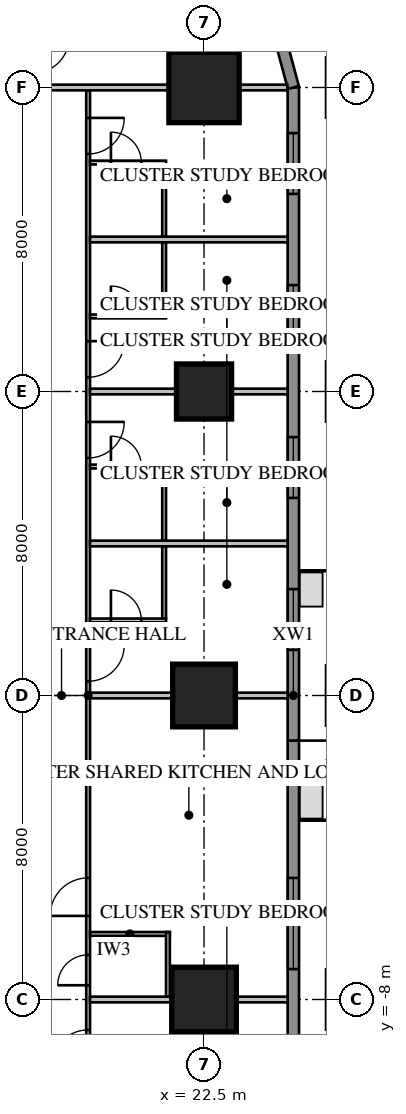
"""IFC4 building model, lengths in metres.
Left out: names, types, materials, properties, quantities, classifications, styles, units other than length and angle.
Written with IfcOpenShell. Run it as: python <this file> out.ifc"""

import sys

from ifc_helpers import new_model, si_unit, direction, frame, frame_2d, origin, origin_2d, place, context, subcontext, project, spatial, rectangle, extrude, element, fill, save


model = new_model("IFC4")
c1 = context("Model", 3, precision=1e-05, world=origin(), true_north=direction((0.0, 1.0)))
c2 = subcontext(c1, "Body", "Model", "MODEL_VIEW")
j1 = project(units=[si_unit("LENGTHUNIT", "METRE"), si_unit("PLANEANGLEUNIT", "RADIAN")], contexts=[c1])
p1 = place(None, origin())
s1 = spatial("IfcSite", under=j1, at=p1, CompositionType="ELEMENT")
p2 = place(p1, origin())
s2 = spatial("IfcBuilding", under=s1, at=p2, CompositionType="ELEMENT")
p3 = place(p2, frame((0.0, 0.0, 35.25)))
s3 = spatial("IfcBuildingStorey", under=s2, at=p3, CompositionType="ELEMENT", Elevation=35.25)
p4 = place(p3, frame((22.5, -8.0, 0.0), z_axis=(0.0, 0.0, 1.0), x_axis=(1.0, 0.0, 0.0)))
e1 = element("IfcColumn", 1, at=p4, inside=s3, PredefinedType="COLUMN", context=c2, shape_type="SweptSolid", body=[
    extrude(rectangle(XDim=1.7, YDim=1.7, at=origin_2d()), origin(), (0.0, 0.0, 1.0), 3.85),
])
p5 = place(p3, frame((22.5, 0.0, 0.0), z_axis=(0.0, 0.0, 1.0), x_axis=(1.0, 0.0, 0.0)))
e2 = element("IfcColumn", 2, at=p5, inside=s3, PredefinedType="COLUMN", context=c2, shape_type="SweptSolid", body=[
    extrude(rectangle(XDim=1.65, YDim=1.65, at=origin_2d()), origin(), (0.0, 0.0, 1.0), 3.85),
])
p6 = place(p3, frame((22.5, 8.0, 0.0), z_axis=(0.0, 0.0, 1.0), x_axis=(1.0, 0.0, 0.0)))
e3 = element("IfcColumn", 3, at=p6, inside=s3, PredefinedType="COLUMN", context=c2, shape_type="SweptSolid", body=[
    extrude(rectangle(XDim=1.45, YDim=1.45, at=origin_2d()), origin(), (0.0, 0.0, 1.0), 3.85),
])
p7 = place(p3, frame((22.5, 16.0, 0.0), z_axis=(0.0, 0.0, 1.0), x_axis=(1.0, 0.0, 0.0)))
e4 = element("IfcColumn", 4, at=p7, inside=s3, PredefinedType="COLUMN", context=c2, shape_type="SweptSolid", body=[
    extrude(rectangle(XDim=1.85, YDim=1.85, at=origin_2d()), origin(), (0.0, 0.0, 1.0), 3.85),
])
p8 = place(p3, frame((24.85, -16.0, 0.0), z_axis=(0.0, 0.0, 1.0), x_axis=(0.0, 1.0, 0.0)))
e5 = element("IfcWall", 5, at=p8, inside=s3, PredefinedType="SOLIDWALL", context=c2, shape_type="SweptSolid", body=[
    extrude(rectangle(XDim=32.0, YDim=0.3, at=frame_2d((16.0, 0.0))), origin(), (0.0, 0.0, 1.0), 3.65),
])
p9 = place(p8, frame((1.2, 0.0, 0.75)))
e6 = element("IfcOpeningElement", 6, at=p9, cuts=e5, PredefinedType="OPENING", context=c2, shape_type="SweptSolid", body=[
    extrude(rectangle(XDim=1.6, YDim=1.8, at=frame_2d((0.8, 0.9))), frame((0.0, 0.17, 0.0), z_axis=(0.0, -1.0, 0.0), x_axis=(1.0, 0.0, 0.0)), (0.0, 0.0, 1.0), 0.34),
])
p10 = place(p8, frame((5.2, 0.0, 0.75)))
e7 = element("IfcOpeningElement", 7, at=p10, cuts=e5, PredefinedType="OPENING", context=c2, shape_type="SweptSolid", body=[
    extrude(rectangle(XDim=1.6, YDim=1.8, at=frame_2d((0.8, 0.9))), frame((0.0, 0.17, 0.0), z_axis=(0.0, -1.0, 0.0), x_axis=(1.0, 0.0, 0.0)), (0.0, 0.0, 1.0), 0.34),
])
p11 = place(p8, frame((17.2, 0.0, 0.75)))
e8 = element("IfcOpeningElement", 8, at=p11, cuts=e5, PredefinedType="OPENING", context=c2, shape_type="SweptSolid", body=[
    extrude(rectangle(XDim=1.6, YDim=1.8, at=frame_2d((0.8, 0.9))), frame((0.0, 0.17, 0.0), z_axis=(0.0, -1.0, 0.0), x_axis=(1.0, 0.0, 0.0)), (0.0, 0.0, 1.0), 0.34),
])
p12 = place(p8, frame((21.2, 0.0, 0.75)))
e9 = element("IfcOpeningElement", 9, at=p12, cuts=e5, PredefinedType="OPENING", context=c2, shape_type="SweptSolid", body=[
    extrude(rectangle(XDim=1.6, YDim=1.8, at=frame_2d((0.8, 0.9))), frame((0.0, 0.17, 0.0), z_axis=(0.0, -1.0, 0.0), x_axis=(1.0, 0.0, 0.0)), (0.0, 0.0, 1.0), 0.34),
])
p13 = place(p8, frame((25.2, 0.0, 0.75)))
e10 = element("IfcOpeningElement", 10, at=p13, cuts=e5, PredefinedType="OPENING", context=c2, shape_type="SweptSolid", body=[
    extrude(rectangle(XDim=1.6, YDim=1.8, at=frame_2d((0.8, 0.9))), frame((0.0, 0.17, 0.0), z_axis=(0.0, -1.0, 0.0), x_axis=(1.0, 0.0, 0.0)), (0.0, 0.0, 1.0), 0.34),
])
p14 = place(p8, frame((29.2, 0.0, 0.75)))
e11 = element("IfcOpeningElement", 11, at=p14, cuts=e5, PredefinedType="OPENING", context=c2, shape_type="SweptSolid", body=[
    extrude(rectangle(XDim=1.6, YDim=1.8, at=frame_2d((0.8, 0.9))), frame((0.0, 0.17, 0.0), z_axis=(0.0, -1.0, 0.0), x_axis=(1.0, 0.0, 0.0)), (0.0, 0.0, 1.0), 0.34),
])
p15 = place(p8, frame((8.8, 0.0, 0.75)))
e12 = element("IfcOpeningElement", 12, at=p15, cuts=e5, PredefinedType="OPENING", context=c2, shape_type="SweptSolid", body=[
    extrude(rectangle(XDim=2.4, YDim=1.8, at=frame_2d((1.2, 0.9))), frame((0.0, 0.17, 0.0), z_axis=(0.0, -1.0, 0.0), x_axis=(1.0, 0.0, 0.0)), (0.0, 0.0, 1.0), 0.34),
])
p16 = place(p8, frame((13.812, 0.0, 0.0)))
e13 = element("IfcOpeningElement", 13, at=p16, cuts=e5, PredefinedType="OPENING", context=c2, shape_type="SweptSolid", body=[
    extrude(rectangle(XDim=1.0, YDim=2.4, at=frame_2d((0.5, 1.2))), frame((0.0, 0.17, 0.0), z_axis=(0.0, -1.0, 0.0), x_axis=(1.0, 0.0, 0.0)), (0.0, 0.0, 1.0), 0.34),
])
p17 = place(p3, frame((24.85, 16.0, 0.0), z_axis=(0.0, 0.0, 1.0), x_axis=(-0.258839972501, 0.965920218567, 0.0)))
e14 = element("IfcWall", 14, at=p17, inside=s3, PredefinedType="SOLIDWALL", context=c2, shape_type="SweptSolid", body=[
    extrude(rectangle(XDim=4.581, YDim=0.3, at=frame_2d((2.291, 0.0))), origin(), (0.0, 0.0, 1.0), 3.65),
])
p18 = place(p3, frame((19.45, -15.925, 0.0), z_axis=(0.0, 0.0, 1.0), x_axis=(0.0, 1.0, 0.0)))
e15 = element("IfcWall", 15, at=p18, inside=s3, PredefinedType="PARTITIONING", context=c2, shape_type="SweptSolid", body=[
    extrude(rectangle(XDim=31.85, YDim=0.1, at=frame_2d((15.925, 0.0))), origin(), (0.0, 0.0, 1.0), 3.65),
])
p19 = place(p18, frame((10.125, 0.0, 0.0)))
e16 = element("IfcOpeningElement", 16, at=p19, cuts=e15, PredefinedType="OPENING", context=c2, shape_type="SweptSolid", body=[
    extrude(rectangle(XDim=1.0, YDim=2.1, at=frame_2d((0.5, 1.05))), frame((0.0, 0.07, 0.0), z_axis=(0.0, -1.0, 0.0), x_axis=(1.0, 0.0, 0.0)), (0.0, 0.0, 1.0), 0.14),
])
p20 = place(p18, frame((8.3, 0.0, 0.0)))
e17 = element("IfcOpeningElement", 17, at=p20, cuts=e15, PredefinedType="OPENING", context=c2, shape_type="SweptSolid", body=[
    extrude(rectangle(XDim=0.8, YDim=2.1, at=frame_2d((0.4, 1.05))), frame((0.0, 0.07, 0.0), z_axis=(0.0, -1.0, 0.0), x_axis=(1.0, 0.0, 0.0)), (0.0, 0.0, 1.0), 0.14),
])
p21 = place(p18, frame((0.3, 0.0, 0.0)))
e18 = element("IfcOpeningElement", 18, at=p21, cuts=e15, PredefinedType="OPENING", context=c2, shape_type="SweptSolid", body=[
    extrude(rectangle(XDim=0.95, YDim=2.1, at=frame_2d((0.475, 1.05))), frame((0.0, 0.07, 0.0), z_axis=(0.0, -1.0, 0.0), x_axis=(1.0, 0.0, 0.0)), (0.0, 0.0, 1.0), 0.14),
])
p22 = place(p18, frame((6.175, 0.0, 0.0)))
e19 = element("IfcOpeningElement", 19, at=p22, cuts=e15, PredefinedType="OPENING", context=c2, shape_type="SweptSolid", body=[
    extrude(rectangle(XDim=0.95, YDim=2.1, at=frame_2d((0.475, 1.05))), frame((0.0, 0.07, 0.0), z_axis=(0.0, -1.0, 0.0), x_axis=(1.0, 0.0, 0.0)), (0.0, 0.0, 1.0), 0.14),
])
p23 = place(p18, frame((16.3, 0.0, 0.0)))
e20 = element("IfcOpeningElement", 20, at=p23, cuts=e15, PredefinedType="OPENING", context=c2, shape_type="SweptSolid", body=[
    extrude(rectangle(XDim=0.95, YDim=2.1, at=frame_2d((0.475, 1.05))), frame((0.0, 0.07, 0.0), z_axis=(0.0, -1.0, 0.0), x_axis=(1.0, 0.0, 0.0)), (0.0, 0.0, 1.0), 0.14),
])
p24 = place(p18, frame((22.175, 0.0, 0.0)))
e21 = element("IfcOpeningElement", 21, at=p24, cuts=e15, PredefinedType="OPENING", context=c2, shape_type="SweptSolid", body=[
    extrude(rectangle(XDim=0.95, YDim=2.1, at=frame_2d((0.475, 1.05))), frame((0.0, 0.07, 0.0), z_axis=(0.0, -1.0, 0.0), x_axis=(1.0, 0.0, 0.0)), (0.0, 0.0, 1.0), 0.14),
])
p25 = place(p18, frame((24.3, 0.0, 0.0)))
e22 = element("IfcOpeningElement", 22, at=p25, cuts=e15, PredefinedType="OPENING", context=c2, shape_type="SweptSolid", body=[
    extrude(rectangle(XDim=0.95, YDim=2.1, at=frame_2d((0.475, 1.05))), frame((0.0, 0.07, 0.0), z_axis=(0.0, -1.0, 0.0), x_axis=(1.0, 0.0, 0.0)), (0.0, 0.0, 1.0), 0.14),
])
p26 = place(p18, frame((30.175, 0.0, 0.0)))
e23 = element("IfcOpeningElement", 23, at=p26, cuts=e15, PredefinedType="OPENING", context=c2, shape_type="SweptSolid", body=[
    extrude(rectangle(XDim=0.95, YDim=2.1, at=frame_2d((0.475, 1.05))), frame((0.0, 0.07, 0.0), z_axis=(0.0, -1.0, 0.0), x_axis=(1.0, 0.0, 0.0)), (0.0, 0.0, 1.0), 0.14),
])
p27 = place(p3, frame((19.5, -6.275, 0.0), z_axis=(0.0, 0.0, 1.0), x_axis=(1.0, 0.0, 0.0)))
e24 = element("IfcWall", 24, at=p27, inside=s3, PredefinedType="PARTITIONING", context=c2, shape_type="SweptSolid", body=[
    extrude(rectangle(XDim=2.1, YDim=0.1, at=frame_2d((1.05, 0.0))), origin(), (0.0, 0.0, 1.0), 3.65),
])
p28 = place(p3, frame((21.55, -7.925, 0.0), z_axis=(0.0, 0.0, 1.0), x_axis=(0.0, 1.0, 0.0)))
e25 = element("IfcWall", 25, at=p28, inside=s3, PredefinedType="PARTITIONING", context=c2, shape_type="SweptSolid", body=[
    extrude(rectangle(XDim=1.7, YDim=0.1, at=frame_2d((0.85, 0.0))), origin(), (0.0, 0.0, 1.0), 3.65),
])
p29 = place(p3, frame((19.5, -8.0, 0.0), z_axis=(0.0, 0.0, 1.0), x_axis=(1.0, 0.0, 0.0)))
e26 = element("IfcWall", 26, at=p29, inside=s3, PredefinedType="PARTITIONING", context=c2, shape_type="SweptSolid", body=[
    extrude(rectangle(XDim=5.2, YDim=0.15, at=frame_2d((2.6, 0.0))), origin(), (0.0, 0.0, 1.0), 3.65),
])
p30 = place(p3, frame((19.5, 0.0, 0.0), z_axis=(0.0, 0.0, 1.0), x_axis=(1.0, 0.0, 0.0)))
e27 = element("IfcWall", 27, at=p30, inside=s3, PredefinedType="PARTITIONING", context=c2, shape_type="SweptSolid", body=[
    extrude(rectangle(XDim=5.2, YDim=0.15, at=frame_2d((2.6, 0.0))), origin(), (0.0, 0.0, 1.0), 2.957),
])
for number, where, z_axis, x_axis in (
    (28, (19.5, 4.0, 0.0), (0.0, 0.0, 1.0), (1.0, 0.0, 0.0)),
    (29, (19.5, 8.0, 0.0), (0.0, 0.0, 1.0), (1.0, 0.0, 0.0)),
    (30, (19.5, 12.0, 0.0), (0.0, 0.0, 1.0), (1.0, 0.0, 0.0)),
):
    element("IfcWall", number, at=place(p3, frame(where, z_axis=z_axis, x_axis=x_axis)), inside=s3, PredefinedType="PARTITIONING", context=c2, shape_type="SweptSolid", body=[
        extrude(rectangle(XDim=5.2, YDim=0.15, at=frame_2d((2.6, 0.0))), origin(), (0.0, 0.0, 1.0), 3.65),
    ])
p31 = place(p3, frame((18.1, 16.0, 0.0), z_axis=(0.0, 0.0, 1.0), x_axis=(1.0, 0.0, 0.0)))
e31 = element("IfcWall", 31, at=p31, inside=s3, PredefinedType="PARTITIONING", context=c2, shape_type="SweptSolid", body=[
    extrude(rectangle(XDim=6.589, YDim=0.15, at=frame_2d((3.295, 0.0))), origin(), (0.0, 0.0, 1.0), 3.65),
])
p32 = place(p3, frame((19.5, 1.975, 0.0), z_axis=(0.0, 0.0, 1.0), x_axis=(1.0, 0.0, 0.0)))
e32 = element("IfcWall", 32, at=p32, inside=s3, PredefinedType="PARTITIONING", context=c2, shape_type="SweptSolid", body=[
    extrude(rectangle(XDim=2.0, YDim=0.1, at=frame_2d((1.0, 0.0))), origin(), (0.0, 0.0, 1.0), 3.65),
])
p33 = place(p32, frame((0.55, 0.0, 0.0)))
e33 = element("IfcOpeningElement", 33, at=p33, cuts=e32, PredefinedType="OPENING", context=c2, shape_type="SweptSolid", body=[
    extrude(rectangle(XDim=0.8, YDim=2.1, at=frame_2d((0.4, 1.05))), frame((0.0, 0.07, 0.0), z_axis=(0.0, -1.0, 0.0), x_axis=(1.0, 0.0, 0.0)), (0.0, 0.0, 1.0), 0.14),
])
p34 = place(p3, frame((21.45, 2.025, 0.0), z_axis=(0.0, 0.0, 1.0), x_axis=(0.0, 1.0, 0.0)))
e34 = element("IfcWall", 34, at=p34, inside=s3, PredefinedType="PARTITIONING", context=c2, shape_type="SweptSolid", body=[
    extrude(rectangle(XDim=1.9, YDim=0.1, at=frame_2d((0.95, 0.0))), origin(), (0.0, 0.0, 1.0), 3.65),
])
p35 = place(p3, frame((19.5, 6.025, 0.0), z_axis=(0.0, 0.0, 1.0), x_axis=(1.0, 0.0, 0.0)))
e35 = element("IfcWall", 35, at=p35, inside=s3, PredefinedType="PARTITIONING", context=c2, shape_type="SweptSolid", body=[
    extrude(rectangle(XDim=2.0, YDim=0.1, at=frame_2d((1.0, 0.0))), origin(), (0.0, 0.0, 1.0), 3.65),
])
p36 = place(p35, frame((0.55, 0.0, 0.0)))
e36 = element("IfcOpeningElement", 36, at=p36, cuts=e35, PredefinedType="OPENING", context=c2, shape_type="SweptSolid", body=[
    extrude(rectangle(XDim=0.8, YDim=2.1, at=frame_2d((0.4, 1.05))), frame((0.0, 0.07, 0.0), z_axis=(0.0, -1.0, 0.0), x_axis=(1.0, 0.0, 0.0)), (0.0, 0.0, 1.0), 0.14),
])
p37 = place(p3, frame((21.45, 4.075, 0.0), z_axis=(0.0, 0.0, 1.0), x_axis=(0.0, 1.0, 0.0)))
e37 = element("IfcWall", 37, at=p37, inside=s3, PredefinedType="PARTITIONING", context=c2, shape_type="SweptSolid", body=[
    extrude(rectangle(XDim=1.9, YDim=0.1, at=frame_2d((0.95, 0.0))), origin(), (0.0, 0.0, 1.0), 3.65),
])
p38 = place(p3, frame((19.5, 9.975, 0.0), z_axis=(0.0, 0.0, 1.0), x_axis=(1.0, 0.0, 0.0)))
e38 = element("IfcWall", 38, at=p38, inside=s3, PredefinedType="PARTITIONING", context=c2, shape_type="SweptSolid", body=[
    extrude(rectangle(XDim=2.0, YDim=0.1, at=frame_2d((1.0, 0.0))), origin(), (0.0, 0.0, 1.0), 3.65),
])
p39 = place(p38, frame((0.55, 0.0, 0.0)))
e39 = element("IfcOpeningElement", 39, at=p39, cuts=e38, PredefinedType="OPENING", context=c2, shape_type="SweptSolid", body=[
    extrude(rectangle(XDim=0.8, YDim=2.1, at=frame_2d((0.4, 1.05))), frame((0.0, 0.07, 0.0), z_axis=(0.0, -1.0, 0.0), x_axis=(1.0, 0.0, 0.0)), (0.0, 0.0, 1.0), 0.14),
])
p40 = place(p3, frame((21.45, 10.025, 0.0), z_axis=(0.0, 0.0, 1.0), x_axis=(0.0, 1.0, 0.0)))
e40 = element("IfcWall", 40, at=p40, inside=s3, PredefinedType="PARTITIONING", context=c2, shape_type="SweptSolid", body=[
    extrude(rectangle(XDim=1.9, YDim=0.1, at=frame_2d((0.95, 0.0))), origin(), (0.0, 0.0, 1.0), 3.65),
])
p41 = place(p3, frame((19.5, 14.025, 0.0), z_axis=(0.0, 0.0, 1.0), x_axis=(1.0, 0.0, 0.0)))
e41 = element("IfcWall", 41, at=p41, inside=s3, PredefinedType="PARTITIONING", context=c2, shape_type="SweptSolid", body=[
    extrude(rectangle(XDim=2.0, YDim=0.1, at=frame_2d((1.0, 0.0))), origin(), (0.0, 0.0, 1.0), 3.65),
])
p42 = place(p41, frame((0.55, 0.0, 0.0)))
e42 = element("IfcOpeningElement", 42, at=p42, cuts=e41, PredefinedType="OPENING", context=c2, shape_type="SweptSolid", body=[
    extrude(rectangle(XDim=0.8, YDim=2.1, at=frame_2d((0.4, 1.05))), frame((0.0, 0.07, 0.0), z_axis=(0.0, -1.0, 0.0), x_axis=(1.0, 0.0, 0.0)), (0.0, 0.0, 1.0), 0.14),
])
p43 = place(p3, frame((21.45, 12.075, 0.0), z_axis=(0.0, 0.0, 1.0), x_axis=(0.0, 1.0, 0.0)))
e43 = element("IfcWall", 43, at=p43, inside=s3, PredefinedType="PARTITIONING", context=c2, shape_type="SweptSolid", body=[
    extrude(rectangle(XDim=1.9, YDim=0.1, at=frame_2d((0.95, 0.0))), origin(), (0.0, 0.0, 1.0), 3.65),
])
p44 = place(p11, origin())
e44 = element("IfcWindow", 44, at=p44, inside=s3, PartitioningType="SINGLE_PANEL", PredefinedType="WINDOW", context=c2, shape_type="SweptSolid", body=[
    extrude(rectangle(XDim=1.6, YDim=1.8, at=frame_2d((0.8, 0.9))), frame((0.0, 0.03, 0.0), z_axis=(0.0, -1.0, 0.0), x_axis=(1.0, 0.0, 0.0)), (0.0, 0.0, 1.0), 0.06),
])
fill(e8, e44)
p45 = place(p12, origin())
e45 = element("IfcWindow", 45, at=p45, inside=s3, PartitioningType="SINGLE_PANEL", PredefinedType="WINDOW", context=c2, shape_type="SweptSolid", body=[
    extrude(rectangle(XDim=1.6, YDim=1.8, at=frame_2d((0.8, 0.9))), frame((0.0, 0.03, 0.0), z_axis=(0.0, -1.0, 0.0), x_axis=(1.0, 0.0, 0.0)), (0.0, 0.0, 1.0), 0.06),
])
fill(e9, e45)
p46 = place(p13, origin())
e46 = element("IfcWindow", 46, at=p46, inside=s3, PartitioningType="SINGLE_PANEL", PredefinedType="WINDOW", context=c2, shape_type="SweptSolid", body=[
    extrude(rectangle(XDim=1.6, YDim=1.8, at=frame_2d((0.8, 0.9))), frame((0.0, 0.03, 0.0), z_axis=(0.0, -1.0, 0.0), x_axis=(1.0, 0.0, 0.0)), (0.0, 0.0, 1.0), 0.06),
])
fill(e10, e46)
p47 = place(p14, origin())
e47 = element("IfcWindow", 47, at=p47, inside=s3, PartitioningType="SINGLE_PANEL", PredefinedType="WINDOW", context=c2, shape_type="SweptSolid", body=[
    extrude(rectangle(XDim=1.6, YDim=1.8, at=frame_2d((0.8, 0.9))), frame((0.0, 0.03, 0.0), z_axis=(0.0, -1.0, 0.0), x_axis=(1.0, 0.0, 0.0)), (0.0, 0.0, 1.0), 0.06),
])
fill(e11, e47)
p48 = place(p15, origin())
e48 = element("IfcWindow", 48, at=p48, inside=s3, PartitioningType="SINGLE_PANEL", PredefinedType="WINDOW", context=c2, shape_type="SweptSolid", body=[
    extrude(rectangle(XDim=2.4, YDim=1.8, at=frame_2d((1.2, 0.9))), frame((0.0, 0.03, 0.0), z_axis=(0.0, -1.0, 0.0), x_axis=(1.0, 0.0, 0.0)), (0.0, 0.0, 1.0), 0.06),
])
fill(e12, e48)
p49 = place(p16, origin())
e49 = element("IfcDoor", 49, at=p49, inside=s3, OperationType="SINGLE_SWING_RIGHT", PredefinedType="DOOR", context=c2, shape_type="SweptSolid", body=[
    extrude(rectangle(XDim=1.0, YDim=2.4, at=frame_2d((0.5, 1.2))), frame((0.0, 0.025, 0.0), z_axis=(0.0, -1.0, 0.0), x_axis=(1.0, 0.0, 0.0)), (0.0, 0.0, 1.0), 0.05),
])
fill(e13, e49)
p50 = place(p19, origin())
e50 = element("IfcDoor", 50, at=p50, inside=s3, OperationType="SINGLE_SWING_LEFT", PredefinedType="DOOR", context=c2, shape_type="SweptSolid", body=[
    extrude(rectangle(XDim=1.0, YDim=2.1, at=frame_2d((0.5, 1.05))), frame((0.0, 0.025, 0.0), z_axis=(0.0, -1.0, 0.0), x_axis=(1.0, 0.0, 0.0)), (0.0, 0.0, 1.0), 0.05),
])
fill(e16, e50)
p51 = place(p20, origin())
e51 = element("IfcDoor", 51, at=p51, inside=s3, OperationType="SINGLE_SWING_LEFT", PredefinedType="DOOR", context=c2, shape_type="SweptSolid", body=[
    extrude(rectangle(XDim=0.8, YDim=2.1, at=frame_2d((0.4, 1.05))), frame((0.0, 0.025, 0.0), z_axis=(0.0, -1.0, 0.0), x_axis=(1.0, 0.0, 0.0)), (0.0, 0.0, 1.0), 0.05),
])
fill(e17, e51)
p52 = place(p22, origin())
e52 = element("IfcDoor", 52, at=p52, inside=s3, OperationType="SINGLE_SWING_LEFT", PredefinedType="DOOR", context=c2, shape_type="SweptSolid", body=[
    extrude(rectangle(XDim=0.95, YDim=2.1, at=frame_2d((0.475, 1.05))), frame((0.0, 0.025, 0.0), z_axis=(0.0, -1.0, 0.0), x_axis=(1.0, 0.0, 0.0)), (0.0, 0.0, 1.0), 0.05),
])
fill(e19, e52)
p53 = place(p23, origin())
e53 = element("IfcDoor", 53, at=p53, inside=s3, OperationType="SINGLE_SWING_RIGHT", PredefinedType="DOOR", context=c2, shape_type="SweptSolid", body=[
    extrude(rectangle(XDim=0.95, YDim=2.1, at=frame_2d((0.475, 1.05))), frame((0.0, 0.025, 0.0), z_axis=(0.0, -1.0, 0.0), x_axis=(1.0, 0.0, 0.0)), (0.0, 0.0, 1.0), 0.05),
])
fill(e20, e53)
p54 = place(p33, origin())
e54 = element("IfcDoor", 54, at=p54, inside=s3, OperationType="SINGLE_SWING_LEFT", PredefinedType="DOOR", context=c2, shape_type="SweptSolid", body=[
    extrude(rectangle(XDim=0.8, YDim=2.1, at=frame_2d((0.4, 1.05))), frame((0.0, 0.025, 0.0), z_axis=(0.0, -1.0, 0.0), x_axis=(1.0, 0.0, 0.0)), (0.0, 0.0, 1.0), 0.05),
])
fill(e33, e54)
p55 = place(p24, origin())
e55 = element("IfcDoor", 55, at=p55, inside=s3, OperationType="SINGLE_SWING_RIGHT", PredefinedType="DOOR", context=c2, shape_type="SweptSolid", body=[
    extrude(rectangle(XDim=0.95, YDim=2.1, at=frame_2d((0.475, 1.05))), frame((0.0, 0.025, 0.0), z_axis=(0.0, -1.0, 0.0), x_axis=(1.0, 0.0, 0.0)), (0.0, 0.0, 1.0), 0.05),
])
fill(e21, e55)
p56 = place(p36, origin())
e56 = element("IfcDoor", 56, at=p56, inside=s3, OperationType="SINGLE_SWING_LEFT", PredefinedType="DOOR", context=c2, shape_type="SweptSolid", body=[
    extrude(rectangle(XDim=0.8, YDim=2.1, at=frame_2d((0.4, 1.05))), frame((0.0, 0.025, 0.0), z_axis=(0.0, -1.0, 0.0), x_axis=(1.0, 0.0, 0.0)), (0.0, 0.0, 1.0), 0.05),
])
fill(e36, e56)
p57 = place(p25, origin())
e57 = element("IfcDoor", 57, at=p57, inside=s3, OperationType="SINGLE_SWING_RIGHT", PredefinedType="DOOR", context=c2, shape_type="SweptSolid", body=[
    extrude(rectangle(XDim=0.95, YDim=2.1, at=frame_2d((0.475, 1.05))), frame((0.0, 0.025, 0.0), z_axis=(0.0, -1.0, 0.0), x_axis=(1.0, 0.0, 0.0)), (0.0, 0.0, 1.0), 0.05),
])
fill(e22, e57)
p58 = place(p39, origin())
e58 = element("IfcDoor", 58, at=p58, inside=s3, OperationType="SINGLE_SWING_LEFT", PredefinedType="DOOR", context=c2, shape_type="SweptSolid", body=[
    extrude(rectangle(XDim=0.8, YDim=2.1, at=frame_2d((0.4, 1.05))), frame((0.0, 0.025, 0.0), z_axis=(0.0, -1.0, 0.0), x_axis=(1.0, 0.0, 0.0)), (0.0, 0.0, 1.0), 0.05),
])
fill(e39, e58)
p59 = place(p26, origin())
e59 = element("IfcDoor", 59, at=p59, inside=s3, OperationType="SINGLE_SWING_RIGHT", PredefinedType="DOOR", context=c2, shape_type="SweptSolid", body=[
    extrude(rectangle(XDim=0.95, YDim=2.1, at=frame_2d((0.475, 1.05))), frame((0.0, 0.025, 0.0), z_axis=(0.0, -1.0, 0.0), x_axis=(1.0, 0.0, 0.0)), (0.0, 0.0, 1.0), 0.05),
])
fill(e23, e59)
p60 = place(p42, origin())
e60 = element("IfcDoor", 60, at=p60, inside=s3, OperationType="SINGLE_SWING_LEFT", PredefinedType="DOOR", context=c2, shape_type="SweptSolid", body=[
    extrude(rectangle(XDim=0.8, YDim=2.1, at=frame_2d((0.4, 1.05))), frame((0.0, 0.025, 0.0), z_axis=(0.0, -1.0, 0.0), x_axis=(1.0, 0.0, 0.0)), (0.0, 0.0, 1.0), 0.05),
])
fill(e42, e60)
save(model, sys.argv[1])
